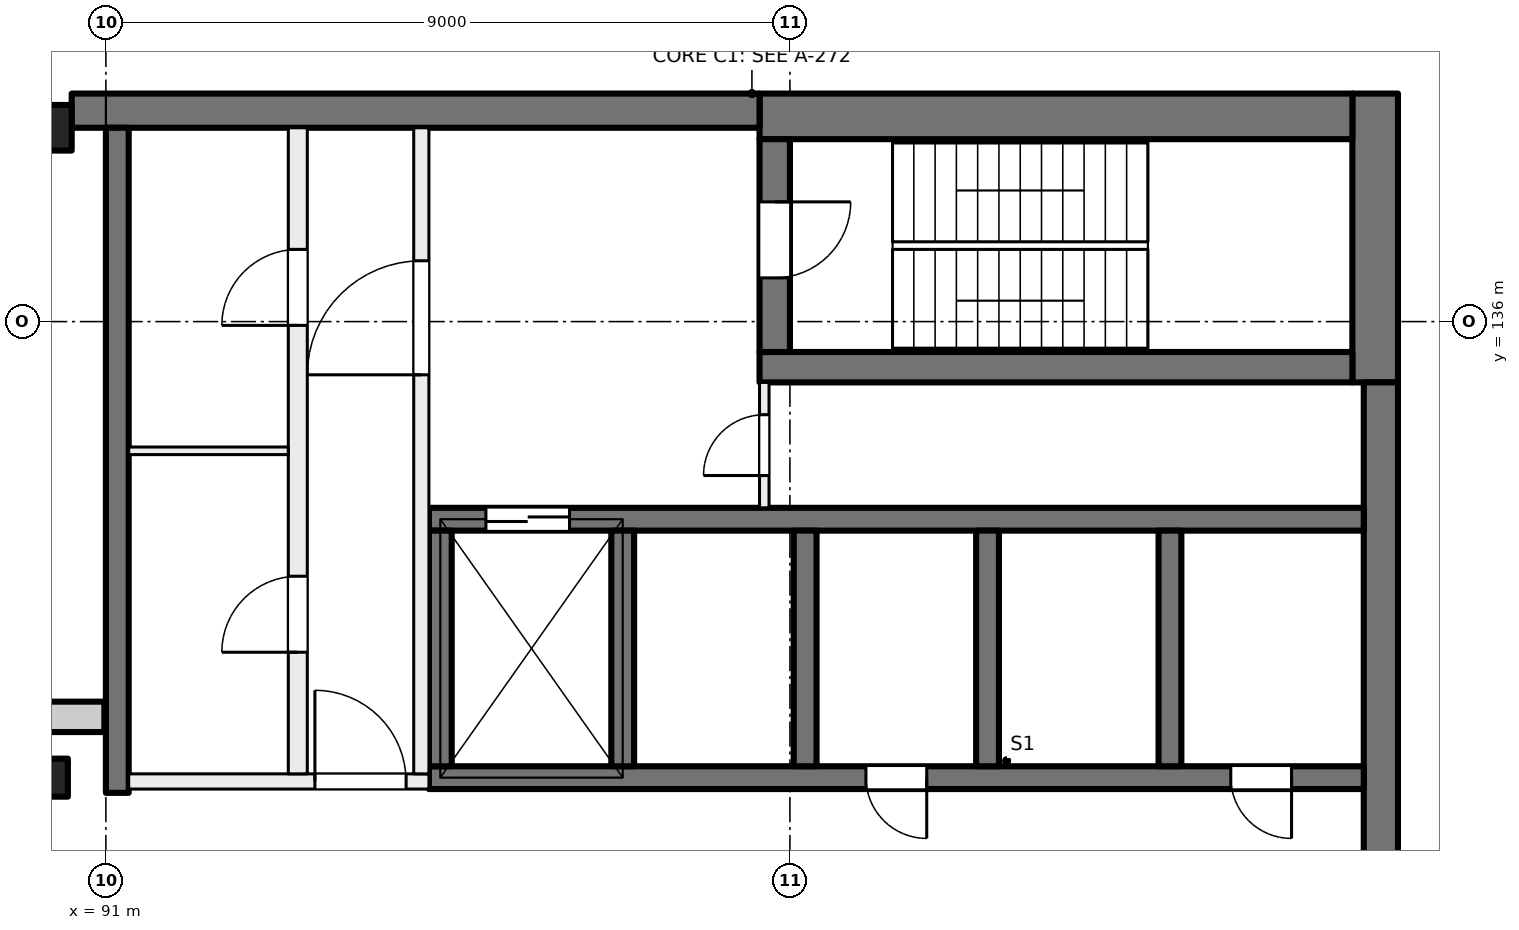
"""IFC4 building model, lengths in metres.
Left out: names, types, materials, properties, quantities, classifications, styles, units other than length and angle.
Written with IfcOpenShell. Run it as: python <this file> out.ifc"""

import sys

from ifc_helpers import new_model, si_unit, direction, frame, frame_2d, origin, origin_2d, place, context, subcontext, project, spatial, rectangle, extrude, element, fill, save


model = new_model("IFC4")
c1 = context("Model", 3, precision=1e-05, world=origin(), true_north=direction((0.0, 1.0)))
c2 = subcontext(c1, "Body", "Model", "MODEL_VIEW")
j1 = project(units=[si_unit("LENGTHUNIT", "METRE"), si_unit("PLANEANGLEUNIT", "RADIAN")], contexts=[c1])
p1 = place(None, origin())
s1 = spatial("IfcSite", under=j1, at=p1, CompositionType="ELEMENT")
p2 = place(p1, origin())
s2 = spatial("IfcBuilding", under=s1, at=p2, CompositionType="ELEMENT")
p3 = place(p2, frame((0.0, 0.0, 291.0)))
s3 = spatial("IfcBuildingStorey", under=s2, at=p3, CompositionType="ELEMENT", Elevation=291.0)
p4 = place(p3, frame((90.25, 130.0, 0.0), z_axis=(0.0, 0.0, 1.0), x_axis=(1.0, 0.0, 0.0)))
e1 = element("IfcColumn", 1, at=p4, inside=s3, PredefinedType="COLUMN", context=c2, shape_type="SweptSolid", body=[
    extrude(rectangle(XDim=0.5, YDim=0.5, at=origin_2d()), origin(), (0.0, 0.0, 1.0), 4.5),
])
p5 = place(p3, frame((90.25, 138.55, 0.0), z_axis=(0.0, 0.0, 1.0), x_axis=(1.0, 0.0, 0.0)))
e2 = element("IfcColumn", 2, at=p5, inside=s3, PredefinedType="COLUMN", context=c2, shape_type="SweptSolid", body=[
    extrude(rectangle(XDim=0.6, YDim=0.6, at=origin_2d()), origin(), (0.0, 0.0, 1.0), 4.5),
])
p6 = place(p3, frame((107.7, 139.0, 0.0), z_axis=(0.0, 0.0, 1.0), x_axis=(0.0, -1.0, 0.0)))
e3 = element("IfcWall", 3, at=p6, inside=s3, PredefinedType="SHEAR", context=c2, shape_type="SweptSolid", body=[
    extrude(rectangle(XDim=3.8, YDim=0.6, at=frame_2d((1.9, 0.0))), origin(), (0.0, 0.0, 1.0), 4.5),
])
p7 = place(p3, frame((107.775, 135.2, 0.0), z_axis=(0.0, 0.0, 1.0), x_axis=(0.0, -1.0, 0.0)))
e4 = element("IfcWall", 4, at=p7, inside=s3, PredefinedType="SHEAR", context=c2, shape_type="SweptSolid", body=[
    extrude(rectangle(XDim=14.4, YDim=0.45, at=frame_2d((7.2, 0.0))), origin(), (0.0, 0.0, 1.0), 4.5),
])
p8 = place(p3, frame((107.4, 138.7, 0.0), z_axis=(0.0, 0.0, 1.0), x_axis=(-1.0, 0.0, 0.0)))
e5 = element("IfcWall", 5, at=p8, inside=s3, PredefinedType="SHEAR", context=c2, shape_type="SweptSolid", body=[
    extrude(rectangle(XDim=7.8, YDim=0.6, at=frame_2d((3.9, 0.0))), origin(), (0.0, 0.0, 1.0), 4.5),
])
p9 = place(p3, frame((99.6, 138.775, 0.0), z_axis=(0.0, 0.0, 1.0), x_axis=(-1.0, 0.0, 0.0)))
e6 = element("IfcWall", 6, at=p9, inside=s3, PredefinedType="SHEAR", context=c2, shape_type="SweptSolid", body=[
    extrude(rectangle(XDim=9.05, YDim=0.45, at=frame_2d((4.525, 0.0))), origin(), (0.0, 0.0, 1.0), 4.5),
])
p10 = place(p3, frame((107.4, 135.4, 0.0), z_axis=(0.0, 0.0, 1.0), x_axis=(-1.0, 0.0, 0.0)))
e7 = element("IfcWall", 7, at=p10, inside=s3, PredefinedType="SHEAR", context=c2, shape_type="SweptSolid", body=[
    extrude(rectangle(XDim=7.8, YDim=0.4, at=frame_2d((3.9, 0.0))), origin(), (0.0, 0.0, 1.0), 4.5),
])
p11 = place(p3, frame((99.8, 138.4, 0.0), z_axis=(0.0, 0.0, 1.0), x_axis=(0.0, -1.0, 0.0)))
e8 = element("IfcWall", 8, at=p11, inside=s3, PredefinedType="SHEAR", context=c2, shape_type="SweptSolid", body=[
    extrude(rectangle(XDim=2.8, YDim=0.4, at=frame_2d((1.4, 0.0))), origin(), (0.0, 0.0, 1.0), 4.5),
])
p12 = place(p11, frame((0.825, 0.0, 0.0)))
e9 = element("IfcOpeningElement", 9, at=p12, cuts=e8, PredefinedType="OPENING", context=c2, shape_type="SweptSolid", body=[
    extrude(rectangle(XDim=1.0, YDim=2.1, at=frame_2d((0.5, 1.05))), frame((0.0, 0.21, 0.0), z_axis=(0.0, -1.0, 0.0), x_axis=(1.0, 0.0, 0.0)), (0.0, 0.0, 1.0), 0.42),
])
p13 = place(p3, frame((107.55, 130.0, 0.0), z_axis=(0.0, 0.0, 1.0), x_axis=(-1.0, 0.0, 0.0)))
e10 = element("IfcWall", 10, at=p13, inside=s3, PredefinedType="SHEAR", context=c2, shape_type="SweptSolid", body=[
    extrude(rectangle(XDim=12.3, YDim=0.3, at=frame_2d((6.15, 0.0))), origin(), (0.0, 0.0, 1.0), 4.5),
])
p14 = place(p13, frame((0.95, 0.0, 0.0)))
e11 = element("IfcOpeningElement", 11, at=p14, cuts=e10, PredefinedType="OPENING", context=c2, shape_type="SweptSolid", body=[
    extrude(rectangle(XDim=0.8, YDim=2.1, at=frame_2d((0.4, 1.05))), frame((0.0, 0.16, 0.0), z_axis=(0.0, -1.0, 0.0), x_axis=(1.0, 0.0, 0.0)), (0.0, 0.0, 1.0), 0.32),
])
p15 = place(p13, frame((5.75, 0.0, 0.0)))
e12 = element("IfcOpeningElement", 12, at=p15, cuts=e10, PredefinedType="OPENING", context=c2, shape_type="SweptSolid", body=[
    extrude(rectangle(XDim=0.8, YDim=2.1, at=frame_2d((0.4, 1.05))), frame((0.0, 0.16, 0.0), z_axis=(0.0, -1.0, 0.0), x_axis=(1.0, 0.0, 0.0)), (0.0, 0.0, 1.0), 0.32),
])
p16 = place(p3, frame((107.55, 133.4, 0.0), z_axis=(0.0, 0.0, 1.0), x_axis=(-1.0, 0.0, 0.0)))
e13 = element("IfcWall", 13, at=p16, inside=s3, PredefinedType="SHEAR", context=c2, shape_type="SweptSolid", body=[
    extrude(rectangle(XDim=12.3, YDim=0.3, at=frame_2d((6.15, 0.0))), origin(), (0.0, 0.0, 1.0), 4.5),
])
p17 = place(p16, frame((10.45, 0.0, 0.0)))
e14 = element("IfcOpeningElement", 14, at=p17, cuts=e13, PredefinedType="OPENING", context=c2, shape_type="SweptSolid", body=[
    extrude(rectangle(XDim=1.1, YDim=2.1, at=frame_2d((0.55, 1.05))), frame((0.0, 0.16, 0.0), z_axis=(0.0, -1.0, 0.0), x_axis=(1.0, 0.0, 0.0)), (0.0, 0.0, 1.0), 0.32),
])
for number, where, z_axis, x_axis in (
    (15, (105.0, 133.25, 0.0), (0.0, 0.0, 1.0), (0.0, -1.0, 0.0)),
    (16, (102.6, 133.25, 0.0), (0.0, 0.0, 1.0), (0.0, -1.0, 0.0)),
    (17, (100.2, 133.25, 0.0), (0.0, 0.0, 1.0), (0.0, -1.0, 0.0)),
    (18, (97.8, 133.25, 0.0), (0.0, 0.0, 1.0), (0.0, -1.0, 0.0)),
    (19, (95.4, 133.25, 0.0), (0.0, 0.0, 1.0), (0.0, -1.0, 0.0)),
):
    element("IfcWall", number, at=place(p3, frame(where, z_axis=z_axis, x_axis=x_axis)), inside=s3, PredefinedType="SHEAR", context=c2, shape_type="SweptSolid", body=[
        extrude(rectangle(XDim=3.1, YDim=0.3, at=frame_2d((1.55, 0.0))), origin(), (0.0, 0.0, 1.0), 4.5),
    ])
p18 = place(p3, frame((91.15, 138.55, 0.0), z_axis=(0.0, 0.0, 1.0), x_axis=(0.0, -1.0, 0.0)))
e20 = element("IfcWall", 20, at=p18, inside=s3, PredefinedType="SHEAR", context=c2, shape_type="SweptSolid", body=[
    extrude(rectangle(XDim=8.75, YDim=0.3, at=frame_2d((4.375, 0.0))), origin(), (0.0, 0.0, 1.0), 4.5),
])
p19 = place(p3, frame((72.42, 130.8, 0.0), z_axis=(0.0, 0.0, 1.0), x_axis=(1.0, 0.0, 0.0)))
e21 = element("IfcWall", 21, at=p19, inside=s3, PredefinedType="SOLIDWALL", context=c2, shape_type="SweptSolid", body=[
    extrude(rectangle(XDim=18.56, YDim=0.4, at=frame_2d((9.28, 0.0))), origin(), (0.0, 0.0, 1.0), 4.125),
])
p20 = place(p3, frame((91.3, 129.95, 0.0), z_axis=(0.0, 0.0, 1.0), x_axis=(1.0, 0.0, 0.0)))
e22 = element("IfcWall", 22, at=p20, inside=s3, PredefinedType="PARTITIONING", context=c2, shape_type="SweptSolid", body=[
    extrude(rectangle(XDim=3.95, YDim=0.2, at=frame_2d((1.975, 0.0))), origin(), (0.0, 0.0, 1.0), 4.125),
])
p21 = place(p20, frame((2.45, 0.0, 0.0)))
e23 = element("IfcOpeningElement", 23, at=p21, cuts=e22, PredefinedType="OPENING", context=c2, shape_type="SweptSolid", body=[
    extrude(rectangle(XDim=1.2, YDim=2.1, at=frame_2d((0.6, 1.05))), frame((0.0, 0.11, 0.0), z_axis=(0.0, -1.0, 0.0), x_axis=(1.0, 0.0, 0.0)), (0.0, 0.0, 1.0), 0.22),
])
p22 = place(p3, frame((95.15, 130.05, 0.0), z_axis=(0.0, 0.0, 1.0), x_axis=(0.0, 1.0, 0.0)))
e24 = element("IfcWall", 24, at=p22, inside=s3, PredefinedType="PARTITIONING", context=c2, shape_type="SweptSolid", body=[
    extrude(rectangle(XDim=8.5, YDim=0.2, at=frame_2d((4.25, 0.0))), origin(), (0.0, 0.0, 1.0), 4.125),
])
p23 = place(p22, frame((5.25, 0.0, 0.0)))
e25 = element("IfcOpeningElement", 25, at=p23, cuts=e24, PredefinedType="OPENING", context=c2, shape_type="SweptSolid", body=[
    extrude(rectangle(XDim=1.5, YDim=2.1, at=frame_2d((0.75, 1.05))), frame((0.0, 0.11, 0.0), z_axis=(0.0, -1.0, 0.0), x_axis=(1.0, 0.0, 0.0)), (0.0, 0.0, 1.0), 0.22),
])
p24 = place(p3, frame((93.525, 130.05, 0.0), z_axis=(0.0, 0.0, 1.0), x_axis=(0.0, 1.0, 0.0)))
e26 = element("IfcWall", 26, at=p24, inside=s3, PredefinedType="PARTITIONING", context=c2, shape_type="SweptSolid", body=[
    extrude(rectangle(XDim=8.5, YDim=0.25, at=frame_2d((4.25, 0.0))), origin(), (0.0, 0.0, 1.0), 4.125),
])
p25 = place(p24, frame((1.6, 0.0, 0.0)))
e27 = element("IfcOpeningElement", 27, at=p25, cuts=e26, PredefinedType="OPENING", context=c2, shape_type="SweptSolid", body=[
    extrude(rectangle(XDim=1.0, YDim=2.1, at=frame_2d((0.5, 1.05))), frame((0.0, 0.135, 0.0), z_axis=(0.0, -1.0, 0.0), x_axis=(1.0, 0.0, 0.0)), (0.0, 0.0, 1.0), 0.27),
])
p26 = place(p24, frame((5.9, 0.0, 0.0)))
e28 = element("IfcOpeningElement", 28, at=p26, cuts=e26, PredefinedType="OPENING", context=c2, shape_type="SweptSolid", body=[
    extrude(rectangle(XDim=1.0, YDim=2.1, at=frame_2d((0.5, 1.05))), frame((0.0, 0.135, 0.0), z_axis=(0.0, -1.0, 0.0), x_axis=(1.0, 0.0, 0.0)), (0.0, 0.0, 1.0), 0.27),
])
p27 = place(p3, frame((99.663, 133.55, 0.0), z_axis=(0.0, 0.0, 1.0), x_axis=(0.0, 1.0, 0.0)))
e29 = element("IfcWall", 29, at=p27, inside=s3, PredefinedType="PARTITIONING", context=c2, shape_type="SweptSolid", body=[
    extrude(rectangle(XDim=1.65, YDim=0.125, at=frame_2d((0.825, 0.0))), origin(), (0.0, 0.0, 1.0), 4.125),
])
p28 = place(p27, frame((0.425, 0.0, 0.0)))
e30 = element("IfcOpeningElement", 30, at=p28, cuts=e29, PredefinedType="OPENING", context=c2, shape_type="SweptSolid", body=[
    extrude(rectangle(XDim=0.8, YDim=2.1, at=frame_2d((0.4, 1.05))), frame((0.0, 0.073, 0.0), z_axis=(0.0, -1.0, 0.0), x_axis=(1.0, 0.0, 0.0)), (0.0, 0.0, 1.0), 0.145),
])
p29 = place(p3, frame((91.3, 134.3, 0.0), z_axis=(0.0, 0.0, 1.0), x_axis=(1.0, 0.0, 0.0)))
e31 = element("IfcWall", 31, at=p29, inside=s3, PredefinedType="PARTITIONING", context=c2, shape_type="SweptSolid", body=[
    extrude(rectangle(XDim=2.1, YDim=0.1, at=frame_2d((1.05, 0.0))), origin(), (0.0, 0.0, 1.0), 4.125),
])
p30 = place(p14, origin())
e32 = element("IfcDoor", 32, at=p30, inside=s3, OperationType="SINGLE_SWING_RIGHT", PredefinedType="DOOR", context=c2, shape_type="SweptSolid", body=[
    extrude(rectangle(XDim=0.8, YDim=2.1, at=frame_2d((0.4, 1.05))), frame((0.0, 0.025, 0.0), z_axis=(0.0, -1.0, 0.0), x_axis=(1.0, 0.0, 0.0)), (0.0, 0.0, 1.0), 0.05),
])
fill(e11, e32)
p31 = place(p15, origin())
e33 = element("IfcDoor", 33, at=p31, inside=s3, OperationType="SINGLE_SWING_LEFT", PredefinedType="DOOR", context=c2, shape_type="SweptSolid", body=[
    extrude(rectangle(XDim=0.8, YDim=2.1, at=frame_2d((0.4, 1.05))), frame((0.0, 0.025, 0.0), z_axis=(0.0, -1.0, 0.0), x_axis=(1.0, 0.0, 0.0)), (0.0, 0.0, 1.0), 0.05),
])
fill(e12, e33)
p32 = place(p21, origin())
e34 = element("IfcDoor", 34, at=p32, inside=s3, OperationType="DOUBLE_DOOR_SINGLE_SWING", PredefinedType="DOOR", context=c2, shape_type="SweptSolid", body=[
    extrude(rectangle(XDim=1.2, YDim=2.1, at=frame_2d((0.6, 1.05))), frame((0.0, 0.025, 0.0), z_axis=(0.0, -1.0, 0.0), x_axis=(1.0, 0.0, 0.0)), (0.0, 0.0, 1.0), 0.05),
])
fill(e23, e34)
p33 = place(p23, origin())
e35 = element("IfcDoor", 35, at=p33, inside=s3, OperationType="DOUBLE_DOOR_SINGLE_SWING", PredefinedType="DOOR", context=c2, shape_type="SweptSolid", body=[
    extrude(rectangle(XDim=1.5, YDim=2.1, at=frame_2d((0.75, 1.05))), frame((0.0, 0.025, 0.0), z_axis=(0.0, -1.0, 0.0), x_axis=(1.0, 0.0, 0.0)), (0.0, 0.0, 1.0), 0.05),
])
fill(e25, e35)
p34 = place(p12, origin())
e36 = element("IfcDoor", 36, at=p34, inside=s3, OperationType="SINGLE_SWING_RIGHT", PredefinedType="DOOR", context=c2, shape_type="SweptSolid", body=[
    extrude(rectangle(XDim=1.0, YDim=2.1, at=frame_2d((0.5, 1.05))), frame((0.0, 0.025, 0.0), z_axis=(0.0, -1.0, 0.0), x_axis=(1.0, 0.0, 0.0)), (0.0, 0.0, 1.0), 0.05),
])
fill(e9, e36)
p35 = place(p28, origin())
e37 = element("IfcDoor", 37, at=p35, inside=s3, OperationType="SINGLE_SWING_LEFT", PredefinedType="DOOR", context=c2, shape_type="SweptSolid", body=[
    extrude(rectangle(XDim=0.8, YDim=2.1, at=frame_2d((0.4, 1.05))), frame((0.0, 0.025, 0.0), z_axis=(0.0, -1.0, 0.0), x_axis=(1.0, 0.0, 0.0)), (0.0, 0.0, 1.0), 0.05),
])
fill(e30, e37)
p36 = place(p25, origin())
e38 = element("IfcDoor", 38, at=p36, inside=s3, OperationType="SINGLE_SWING_RIGHT", PredefinedType="DOOR", context=c2, shape_type="SweptSolid", body=[
    extrude(rectangle(XDim=1.0, YDim=2.1, at=frame_2d((0.5, 1.05))), frame((0.0, 0.025, 0.0), z_axis=(0.0, -1.0, 0.0), x_axis=(1.0, 0.0, 0.0)), (0.0, 0.0, 1.0), 0.05),
])
fill(e27, e38)
p37 = place(p26, origin())
e39 = element("IfcDoor", 39, at=p37, inside=s3, OperationType="SINGLE_SWING_LEFT", PredefinedType="DOOR", context=c2, shape_type="SweptSolid", body=[
    extrude(rectangle(XDim=1.0, YDim=2.1, at=frame_2d((0.5, 1.05))), frame((0.0, 0.025, 0.0), z_axis=(0.0, -1.0, 0.0), x_axis=(1.0, 0.0, 0.0)), (0.0, 0.0, 1.0), 0.05),
])
fill(e28, e39)
p38 = place(p17, origin())
e40 = element("IfcDoor", 40, at=p38, inside=s3, OperationType="DOUBLE_DOOR_SLIDING", PredefinedType="DOOR", context=c2, shape_type="SweptSolid", body=[
    extrude(rectangle(XDim=1.1, YDim=2.1, at=frame_2d((0.55, 1.05))), frame((0.0, 0.025, 0.0), z_axis=(0.0, -1.0, 0.0), x_axis=(1.0, 0.0, 0.0)), (0.0, 0.0, 1.0), 0.05),
])
fill(e14, e40)
save(model, sys.argv[1])
